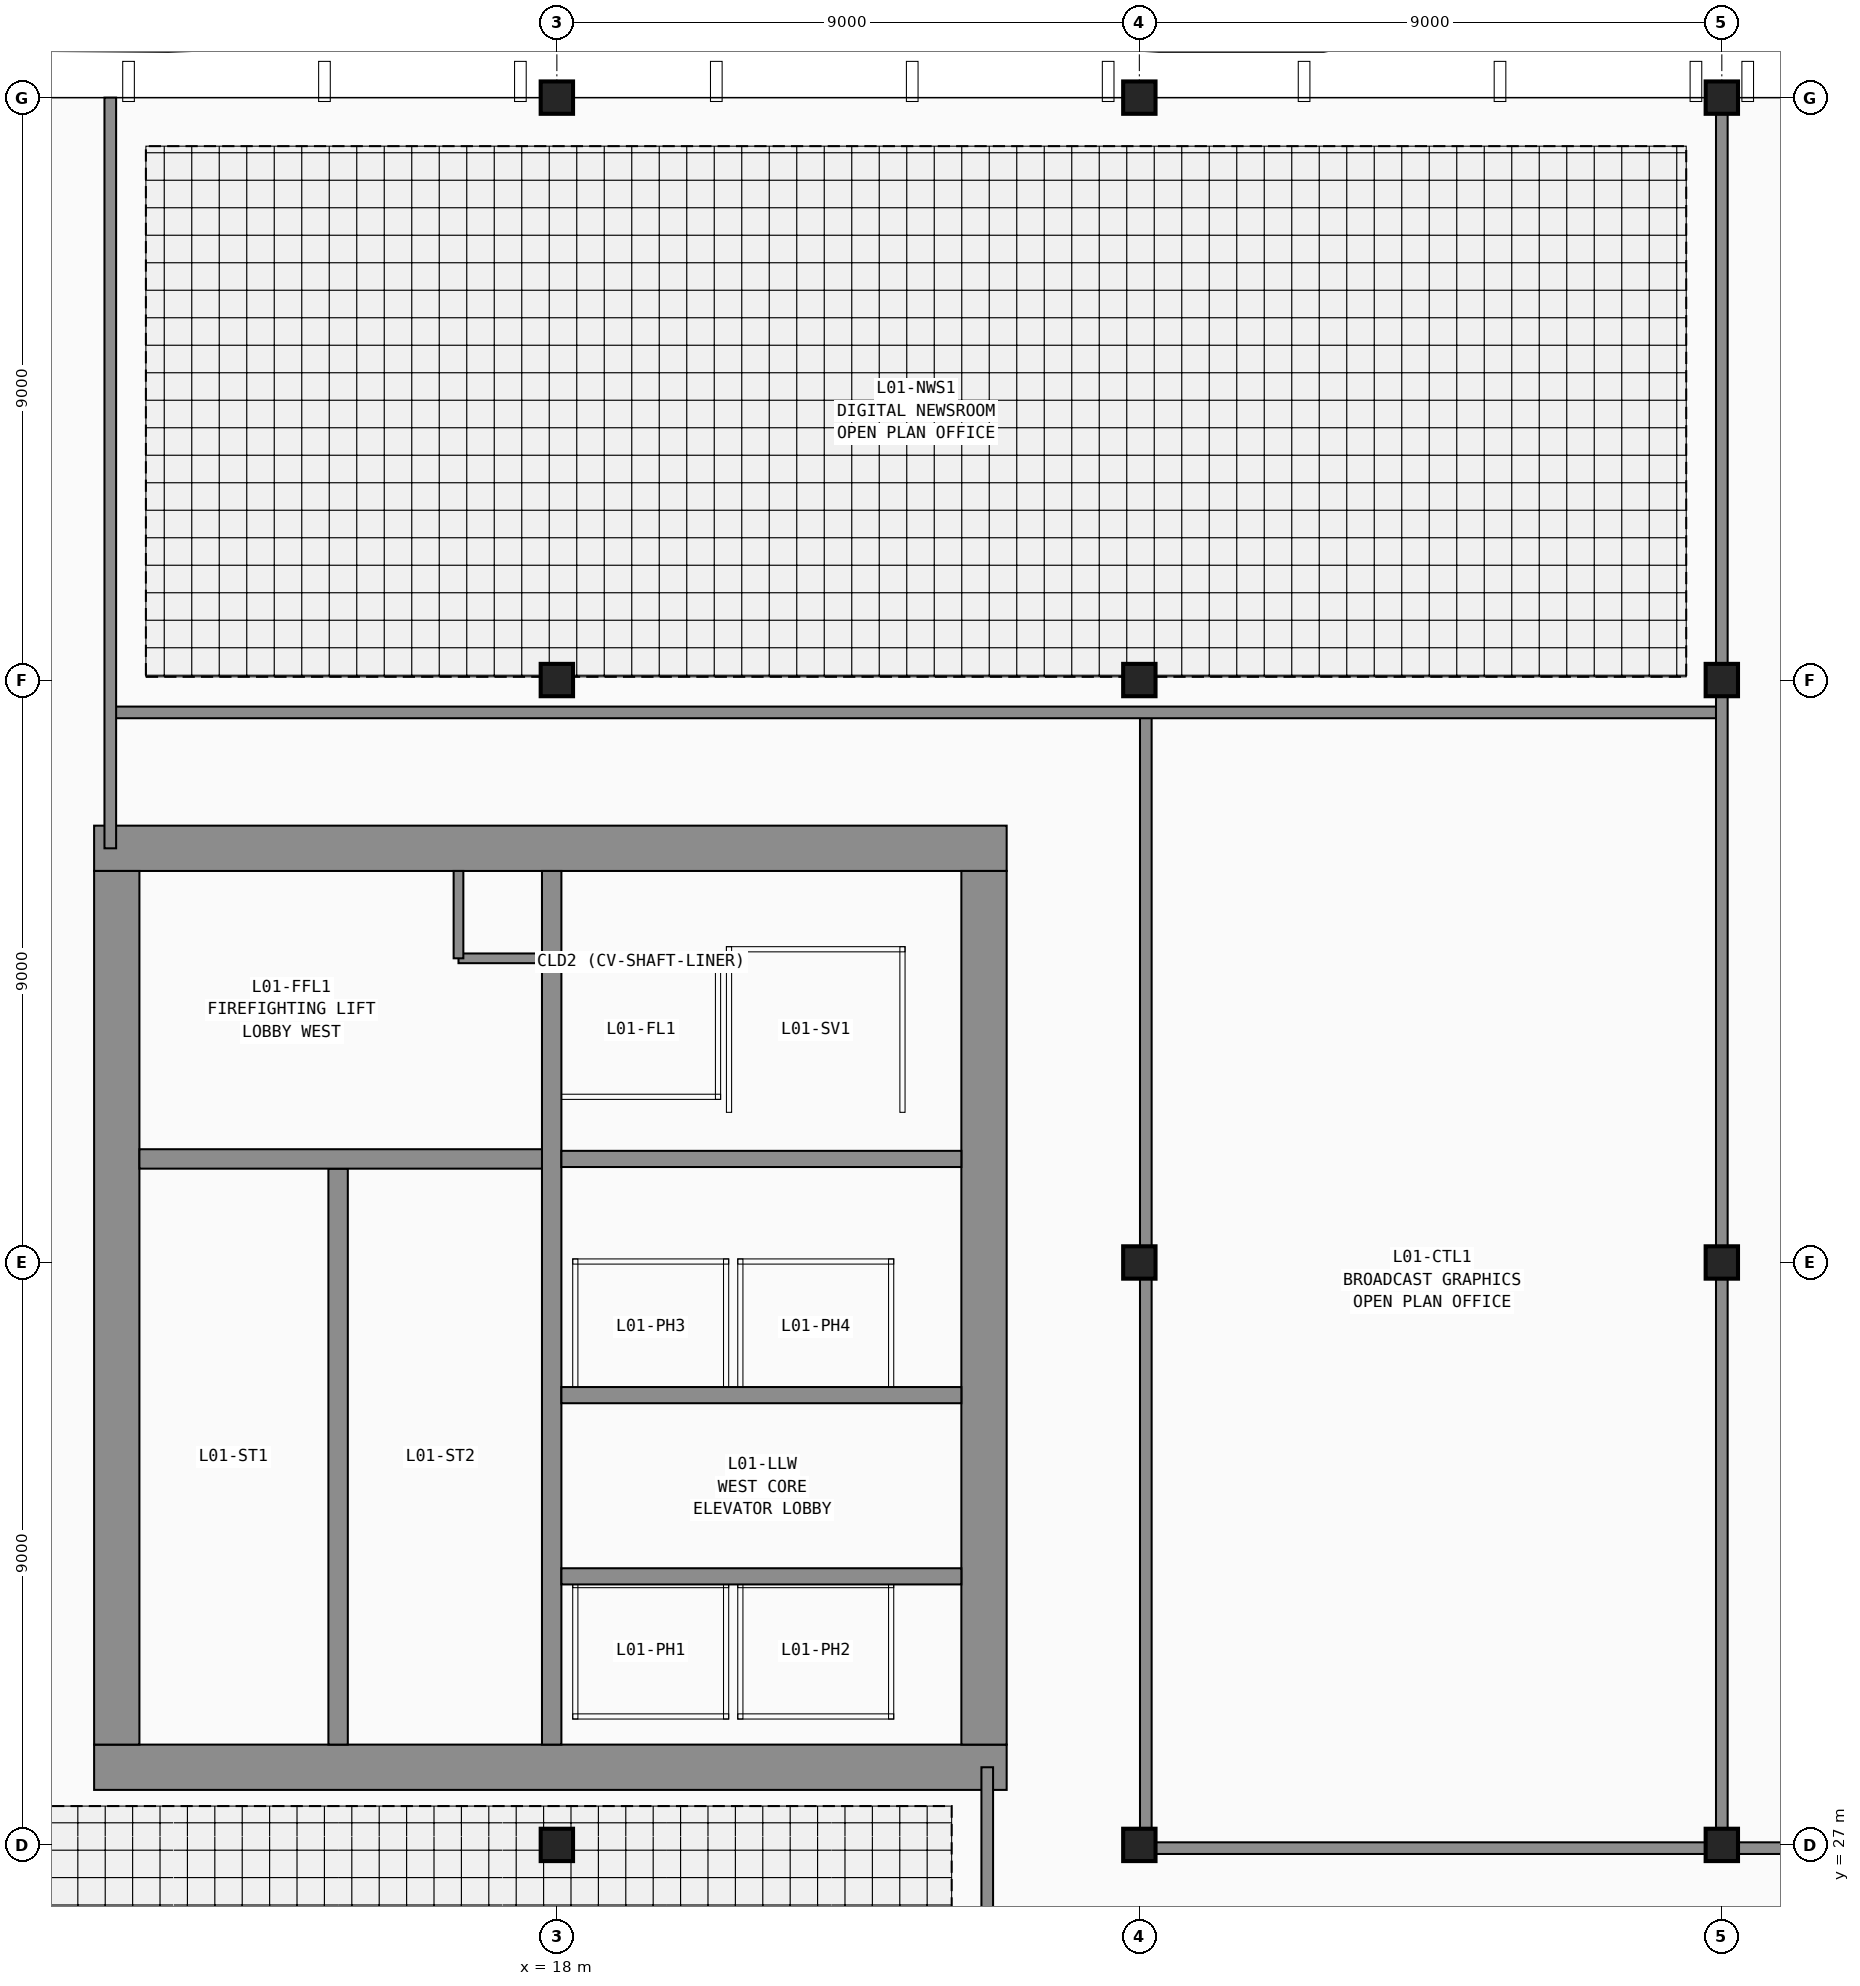
"""IFC4 building model, lengths in metres.
Left out: names, types, materials, properties, quantities, classifications, styles, units other than length and angle.
Written with IfcOpenShell. Run it as: python <this file> out.ifc"""

import sys

from ifc_helpers import new_model, si_unit, direction, frame, frame_2d, origin, origin_2d, place, context, subcontext, project, spatial, rectangle, i_section, extrude, element, fill, save


model = new_model("IFC4")
c1 = context("Model", 3, precision=1e-05, world=origin(), true_north=direction((0.0, 1.0)))
c2 = subcontext(c1, "Body", "Model", "MODEL_VIEW")
j1 = project(units=[si_unit("LENGTHUNIT", "METRE"), si_unit("PLANEANGLEUNIT", "RADIAN")], contexts=[c1])
p1 = place(None, origin())
s1 = spatial("IfcSite", under=j1, at=p1, CompositionType="ELEMENT")
p2 = place(p1, origin())
s2 = spatial("IfcBuilding", under=s1, at=p2, CompositionType="ELEMENT")
p3 = place(p2, frame((0.0, 0.0, 5.8)))
s3 = spatial("IfcBuildingStorey", under=s2, at=p3, CompositionType="ELEMENT", Elevation=5.8)
for number, where, z_axis, x_axis in (
    (1, (18.0, 27.0, 0.0), (0.0, 0.0, 1.0), (1.0, 0.0, 0.0)),
    (2, (18.0, 45.0, 0.0), (0.0, 0.0, 1.0), (1.0, 0.0, 0.0)),
    (3, (18.0, 54.0, 0.0), (0.0, 0.0, 1.0), (1.0, 0.0, 0.0)),
    (4, (27.0, 27.0, 0.0), (0.0, 0.0, 1.0), (1.0, 0.0, 0.0)),
    (5, (27.0, 36.0, 0.0), (0.0, 0.0, 1.0), (1.0, 0.0, 0.0)),
    (6, (27.0, 45.0, 0.0), (0.0, 0.0, 1.0), (1.0, 0.0, 0.0)),
    (7, (27.0, 54.0, 0.0), (0.0, 0.0, 1.0), (1.0, 0.0, 0.0)),
    (8, (36.0, 27.0, 0.0), (0.0, 0.0, 1.0), (1.0, 0.0, 0.0)),
    (9, (36.0, 36.0, 0.0), (0.0, 0.0, 1.0), (1.0, 0.0, 0.0)),
    (10, (36.0, 45.0, 0.0), (0.0, 0.0, 1.0), (1.0, 0.0, 0.0)),
    (11, (36.0, 54.0, 0.0), (0.0, 0.0, 1.0), (1.0, 0.0, 0.0)),
):
    element("IfcColumn", number, at=place(p3, frame(where, z_axis=z_axis, x_axis=x_axis)), inside=s3, PredefinedType="COLUMN", context=c2, shape_type="SweptSolid", body=[
        extrude(i_section(OverallWidth=0.442, OverallDepth=0.531, WebThickness=0.066, FlangeThickness=0.106, FilletRadius=0.015, at=origin_2d()), origin(), (0.0, 0.0, 1.0), 5.2),
    ])
p4 = place(p3, frame((10.85, 28.2, 0.0), z_axis=(0.0, 0.0, 1.0), x_axis=(1.0, 0.0, 0.0)))
e12 = element("IfcWall", 12, at=p4, inside=s3, PredefinedType="SHEAR", context=c2, shape_type="SweptSolid", body=[
    extrude(rectangle(XDim=14.1, YDim=0.7, at=frame_2d((7.05, 0.0))), origin(), (0.0, 0.0, 1.0), 4.88),
])
p5 = place(p3, frame((24.95, 42.4, 0.0), z_axis=(0.0, 0.0, 1.0), x_axis=(-1.0, 0.0, 0.0)))
e13 = element("IfcWall", 13, at=p5, inside=s3, PredefinedType="SHEAR", context=c2, shape_type="SweptSolid", body=[
    extrude(rectangle(XDim=14.1, YDim=0.7, at=frame_2d((7.05, 0.0))), origin(), (0.0, 0.0, 1.0), 4.88),
])
p6 = place(p5, frame((10.15, 0.0, 0.0)))
e14 = element("IfcOpeningElement", 14, at=p6, cuts=e13, PredefinedType="OPENING", context=c2, shape_type="SweptSolid", body=[
    extrude(rectangle(XDim=1.2, YDim=2.15, at=frame_2d((0.6, 1.075))), frame((0.0, 0.36, 0.0), z_axis=(0.0, -1.0, 0.0), x_axis=(1.0, 0.0, 0.0)), (0.0, 0.0, 1.0), 0.72),
])
p7 = place(p3, frame((11.2, 42.05, 0.0), z_axis=(0.0, 0.0, 1.0), x_axis=(0.0, -1.0, 0.0)))
e15 = element("IfcWall", 15, at=p7, inside=s3, PredefinedType="SHEAR", context=c2, shape_type="SweptSolid", body=[
    extrude(rectangle(XDim=13.5, YDim=0.7, at=frame_2d((6.75, 0.0))), origin(), (0.0, 0.0, 1.0), 4.88),
])
p8 = place(p3, frame((24.6, 28.55, 0.0), z_axis=(0.0, 0.0, 1.0), x_axis=(0.0, 1.0, 0.0)))
e16 = element("IfcWall", 16, at=p8, inside=s3, PredefinedType="SHEAR", context=c2, shape_type="SweptSolid", body=[
    extrude(rectangle(XDim=13.5, YDim=0.7, at=frame_2d((6.75, 0.0))), origin(), (0.0, 0.0, 1.0), 4.88),
])
p9 = place(p8, frame((3.25, 0.0, 0.0)))
e17 = element("IfcOpeningElement", 17, at=p9, cuts=e16, PredefinedType="OPENING", context=c2, shape_type="SweptSolid", body=[
    extrude(rectangle(XDim=1.5, YDim=2.2, at=frame_2d((0.75, 1.1))), frame((0.0, 0.36, 0.0), z_axis=(0.0, -1.0, 0.0), x_axis=(1.0, 0.0, 0.0)), (0.0, 0.0, 1.0), 0.72),
])
p10 = place(p8, frame((9.85, 0.0, 0.0)))
e18 = element("IfcOpeningElement", 18, at=p10, cuts=e16, PredefinedType="OPENING", context=c2, shape_type="SweptSolid", body=[
    extrude(rectangle(XDim=0.9, YDim=2.1, at=frame_2d((0.45, 1.05))), frame((0.0, 0.36, 0.0), z_axis=(0.0, -1.0, 0.0), x_axis=(1.0, 0.0, 0.0)), (0.0, 0.0, 1.0), 0.72),
])
p11 = place(p3, frame((14.62, 28.55, 0.0), z_axis=(0.0, 0.0, 1.0), x_axis=(0.0, 1.0, 0.0)))
e19 = element("IfcWall", 19, at=p11, inside=s3, PredefinedType="SHEAR", context=c2, shape_type="SweptSolid", body=[
    extrude(rectangle(XDim=8.9, YDim=0.3, at=frame_2d((4.45, 0.0))), origin(), (0.0, 0.0, 1.0), 4.88),
])
p12 = place(p3, frame((17.92, 42.05, 0.0), z_axis=(0.0, 0.0, 1.0), x_axis=(0.0, -1.0, 0.0)))
e20 = element("IfcWall", 20, at=p12, inside=s3, PredefinedType="SHEAR", context=c2, shape_type="SweptSolid", body=[
    extrude(rectangle(XDim=13.5, YDim=0.3, at=frame_2d((6.75, 0.0))), origin(), (0.0, 0.0, 1.0), 4.88),
])
p13 = place(p12, frame((1.875, 0.0, 0.0)))
e21 = element("IfcOpeningElement", 21, at=p13, cuts=e20, PredefinedType="OPENING", context=c2, shape_type="SweptSolid", body=[
    extrude(rectangle(XDim=1.15, YDim=2.15, at=frame_2d((0.575, 1.075))), frame((0.0, 0.16, 0.0), z_axis=(0.0, -1.0, 0.0), x_axis=(1.0, 0.0, 0.0)), (0.0, 0.0, 1.0), 0.32),
])
p14 = place(p3, frame((17.77, 37.6, 0.0), z_axis=(0.0, 0.0, 1.0), x_axis=(-1.0, 0.0, 0.0)))
e22 = element("IfcWall", 22, at=p14, inside=s3, PredefinedType="SHEAR", context=c2, shape_type="SweptSolid", body=[
    extrude(rectangle(XDim=6.22, YDim=0.3, at=frame_2d((3.11, 0.0))), origin(), (0.0, 0.0, 1.0), 4.88),
])
p15 = place(p14, frame((4.22, 0.0, 0.0)))
e23 = element("IfcOpeningElement", 23, at=p15, cuts=e22, PredefinedType="OPENING", context=c2, shape_type="SweptSolid", body=[
    extrude(rectangle(XDim=1.2, YDim=2.15, at=frame_2d((0.6, 1.075))), frame((0.0, 0.16, 0.0), z_axis=(0.0, -1.0, 0.0), x_axis=(1.0, 0.0, 0.0)), (0.0, 0.0, 1.0), 0.32),
])
p16 = place(p14, frame((1.12, 0.0, 0.0)))
e24 = element("IfcOpeningElement", 24, at=p16, cuts=e22, PredefinedType="OPENING", context=c2, shape_type="SweptSolid", body=[
    extrude(rectangle(XDim=1.2, YDim=2.15, at=frame_2d((0.6, 1.075))), frame((0.0, 0.16, 0.0), z_axis=(0.0, -1.0, 0.0), x_axis=(1.0, 0.0, 0.0)), (0.0, 0.0, 1.0), 0.32),
])
p17 = place(p3, frame((16.48, 40.7, 0.0), z_axis=(0.0, 0.0, 1.0), x_axis=(1.0, 0.0, 0.0)))
e25 = element("IfcWall", 25, at=p17, inside=s3, PredefinedType="PARTITIONING", context=c2, shape_type="SweptSolid", body=[
    extrude(rectangle(XDim=1.29, YDim=0.15, at=frame_2d((0.645, 0.0))), origin(), (0.0, 0.0, 1.0), 4.88),
])
p18 = place(p3, frame((16.48, 40.7, 0.0), z_axis=(0.0, 0.0, 1.0), x_axis=(0.0, 1.0, 0.0)))
e26 = element("IfcWall", 26, at=p18, inside=s3, PredefinedType="PARTITIONING", context=c2, shape_type="SweptSolid", body=[
    extrude(rectangle(XDim=1.35, YDim=0.15, at=frame_2d((0.675, 0.0))), origin(), (0.0, 0.0, 1.0), 4.88),
])
p19 = place(p3, frame((18.07, 37.6, 0.0), z_axis=(0.0, 0.0, 1.0), x_axis=(1.0, 0.0, 0.0)))
e27 = element("IfcWall", 27, at=p19, inside=s3, PredefinedType="PARTITIONING", context=c2, shape_type="SweptSolid", body=[
    extrude(rectangle(XDim=6.18, YDim=0.25, at=frame_2d((3.09, 0.0))), origin(), (0.0, 0.0, 1.0), 4.88),
])
p20 = place(p19, frame((3.03, 0.0, 0.0)))
e28 = element("IfcOpeningElement", 28, at=p20, cuts=e27, PredefinedType="OPENING", context=c2, shape_type="SweptSolid", body=[
    extrude(rectangle(XDim=1.8, YDim=2.3, at=frame_2d((0.9, 1.15))), frame((0.0, 0.135, 0.0), z_axis=(0.0, -1.0, 0.0), x_axis=(1.0, 0.0, 0.0)), (0.0, 0.0, 1.0), 0.27),
])
for number, where, z_axis, x_axis in (
    (29, (18.07, 31.15, 0.0), (0.0, 0.0, 1.0), (1.0, 0.0, 0.0)),
    (30, (24.25, 33.95, 0.0), (0.0, 0.0, 1.0), (-1.0, 0.0, 0.0)),
):
    element("IfcWall", number, at=place(p3, frame(where, z_axis=z_axis, x_axis=x_axis)), inside=s3, PredefinedType="PARTITIONING", context=c2, shape_type="SweptSolid", body=[
        extrude(rectangle(XDim=6.18, YDim=0.25, at=frame_2d((3.09, 0.0))), origin(), (0.0, 0.0, 1.0), 4.88),
    ])
p21 = place(p3, frame((24.65, 1.8, 0.0), z_axis=(0.0, 0.0, 1.0), x_axis=(0.0, 1.0, 0.0)))
e31 = element("IfcWall", 31, at=p21, inside=s3, PredefinedType="PARTITIONING", context=c2, shape_type="SweptSolid", body=[
    extrude(rectangle(XDim=26.4, YDim=0.18, at=frame_2d((13.2, 0.0))), origin(), (0.0, 0.0, 1.0), 3.912),
])
p22 = place(p21, frame((12.2, 0.0, 0.0)))
e32 = element("IfcOpeningElement", 32, at=p22, cuts=e31, PredefinedType="OPENING", context=c2, shape_type="SweptSolid", body=[
    extrude(rectangle(XDim=1.4, YDim=2.15, at=frame_2d((0.7, 1.075))), frame((0.0, 0.1, 0.0), z_axis=(0.0, -1.0, 0.0), x_axis=(1.0, 0.0, 0.0)), (0.0, 0.0, 1.0), 0.2),
])
p23 = place(p3, frame((27.1, 26.95, 0.0), z_axis=(0.0, 0.0, 1.0), x_axis=(1.0, 0.0, 0.0)))
e33 = element("IfcWall", 33, at=p23, inside=s3, PredefinedType="PARTITIONING", context=c2, shape_type="SweptSolid", body=[
    extrude(rectangle(XDim=35.9, YDim=0.18, at=frame_2d((17.95, 0.0))), origin(), (0.0, 0.0, 1.0), 3.933),
])
p24 = place(p3, frame((27.1, 26.95, 0.0), z_axis=(0.0, 0.0, 1.0), x_axis=(0.0, 1.0, 0.0)))
e34 = element("IfcWall", 34, at=p24, inside=s3, PredefinedType="PARTITIONING", context=c2, shape_type="SweptSolid", body=[
    extrude(rectangle(XDim=17.55, YDim=0.18, at=frame_2d((8.775, 0.0))), origin(), (0.0, 0.0, 1.0), 3.933),
])
p25 = place(p24, frame((4.5, 0.0, 0.0)))
e35 = element("IfcOpeningElement", 35, at=p25, cuts=e34, PredefinedType="OPENING", context=c2, shape_type="SweptSolid", body=[
    extrude(rectangle(XDim=1.0, YDim=2.1, at=frame_2d((0.5, 1.05))), frame((0.0, 0.1, 0.0), z_axis=(0.0, -1.0, 0.0), x_axis=(1.0, 0.0, 0.0)), (0.0, 0.0, 1.0), 0.2),
])
p26 = place(p3, frame((11.1, 44.5, 0.0), z_axis=(0.0, 0.0, 1.0), x_axis=(1.0, 0.0, 0.0)))
e36 = element("IfcWall", 36, at=p26, inside=s3, PredefinedType="PARTITIONING", context=c2, shape_type="SweptSolid", body=[
    extrude(rectangle(XDim=24.9, YDim=0.18, at=frame_2d((12.45, 0.0))), origin(), (0.0, 0.0, 1.0), 4.005),
])
p27 = place(p26, frame((4.5, 0.0, 0.0)))
e37 = element("IfcOpeningElement", 37, at=p27, cuts=e36, PredefinedType="OPENING", context=c2, shape_type="SweptSolid", body=[
    extrude(rectangle(XDim=1.05, YDim=2.15, at=frame_2d((0.525, 1.075))), frame((0.0, 0.1, 0.0), z_axis=(0.0, -1.0, 0.0), x_axis=(1.0, 0.0, 0.0)), (0.0, 0.0, 1.0), 0.2),
])
p28 = place(p3, frame((36.0, 26.95, 0.0), z_axis=(0.0, 0.0, 1.0), x_axis=(0.0, 1.0, 0.0)))
e38 = element("IfcWall", 38, at=p28, inside=s3, PredefinedType="PARTITIONING", context=c2, shape_type="SweptSolid", body=[
    extrude(rectangle(XDim=27.05, YDim=0.18, at=frame_2d((13.525, 0.0))), origin(), (0.0, 0.0, 1.0), 3.933),
])
p29 = place(p28, frame((4.5, 0.0, 0.0)))
e39 = element("IfcOpeningElement", 39, at=p29, cuts=e38, PredefinedType="OPENING", context=c2, shape_type="SweptSolid", body=[
    extrude(rectangle(XDim=1.2, YDim=2.15, at=frame_2d((0.6, 1.075))), frame((0.0, 0.1, 0.0), z_axis=(0.0, -1.0, 0.0), x_axis=(1.0, 0.0, 0.0)), (0.0, 0.0, 1.0), 0.2),
])
p30 = place(p3, frame((11.1, 42.4, 0.0), z_axis=(0.0, 0.0, 1.0), x_axis=(0.0, 1.0, 0.0)))
e40 = element("IfcWall", 40, at=p30, inside=s3, PredefinedType="PARTITIONING", context=c2, shape_type="SweptSolid", body=[
    extrude(rectangle(XDim=11.6, YDim=0.18, at=frame_2d((5.8, 0.0))), origin(), (0.0, 0.0, 1.0), 3.933),
])
p31 = place(p30, frame((4.5, 0.0, 0.0)))
e41 = element("IfcOpeningElement", 41, at=p31, cuts=e40, PredefinedType="OPENING", context=c2, shape_type="SweptSolid", body=[
    extrude(rectangle(XDim=0.95, YDim=2.1, at=frame_2d((0.475, 1.05))), frame((0.0, 0.1, 0.0), z_axis=(0.0, -1.0, 0.0), x_axis=(1.0, 0.0, 0.0)), (0.0, 0.0, 1.0), 0.2),
])
p32 = place(p3, frame((0.0, 0.0, -0.32)))
p33 = place(p32, frame((10.2, 48.0, 0.0)))
p34 = place(p33, frame((0.0, 0.0, 0.27)))
e42 = element("IfcDoor", 42, at=p34, inside=s3, OperationType="SINGLE_SWING_LEFT", PredefinedType="TRAPDOOR", context=c2, shape_type="SweptSolid", body=[
    extrude(rectangle(XDim=1.0, YDim=1.2, at=origin_2d()), origin(), (0.0, 0.0, 1.0), 0.05),
])
p35 = place(p15, origin())
e43 = element("IfcDoor", 43, at=p35, inside=s3, OperationType="SINGLE_SWING_LEFT", PredefinedType="DOOR", context=c2, shape_type="SweptSolid", body=[
    extrude(rectangle(XDim=1.2, YDim=2.15, at=frame_2d((0.6, 1.075))), frame((0.0, 0.025, 0.0), z_axis=(0.0, -1.0, 0.0), x_axis=(1.0, 0.0, 0.0)), (0.0, 0.0, 1.0), 0.05),
])
fill(e23, e43)
p36 = place(p16, origin())
e44 = element("IfcDoor", 44, at=p36, inside=s3, OperationType="SINGLE_SWING_RIGHT", PredefinedType="DOOR", context=c2, shape_type="SweptSolid", body=[
    extrude(rectangle(XDim=1.2, YDim=2.15, at=frame_2d((0.6, 1.075))), frame((0.0, 0.025, 0.0), z_axis=(0.0, -1.0, 0.0), x_axis=(1.0, 0.0, 0.0)), (0.0, 0.0, 1.0), 0.05),
])
fill(e24, e44)
p37 = place(p9, origin())
e45 = element("IfcDoor", 45, at=p37, inside=s3, OperationType="DOUBLE_DOOR_SINGLE_SWING", PredefinedType="DOOR", context=c2, shape_type="SweptSolid", body=[
    extrude(rectangle(XDim=1.5, YDim=2.2, at=frame_2d((0.75, 1.1))), frame((0.0, 0.025, 0.0), z_axis=(0.0, -1.0, 0.0), x_axis=(1.0, 0.0, 0.0)), (0.0, 0.0, 1.0), 0.05),
])
fill(e17, e45)
p38 = place(p6, origin())
e46 = element("IfcDoor", 46, at=p38, inside=s3, OperationType="SINGLE_SWING_LEFT", PredefinedType="DOOR", context=c2, shape_type="SweptSolid", body=[
    extrude(rectangle(XDim=1.2, YDim=2.15, at=frame_2d((0.6, 1.075))), frame((0.0, 0.025, 0.0), z_axis=(0.0, -1.0, 0.0), x_axis=(1.0, 0.0, 0.0)), (0.0, 0.0, 1.0), 0.05),
])
fill(e14, e46)
p39 = place(p10, origin())
e47 = element("IfcDoor", 47, at=p39, inside=s3, OperationType="SINGLE_SWING_LEFT", PredefinedType="DOOR", context=c2, shape_type="SweptSolid", body=[
    extrude(rectangle(XDim=0.9, YDim=2.1, at=frame_2d((0.45, 1.05))), frame((0.0, 0.025, 0.0), z_axis=(0.0, -1.0, 0.0), x_axis=(1.0, 0.0, 0.0)), (0.0, 0.0, 1.0), 0.05),
])
fill(e18, e47)
p40 = place(p13, origin())
e48 = element("IfcDoor", 48, at=p40, inside=s3, OperationType="DOUBLE_DOOR_SLIDING", PredefinedType="DOOR", context=c2, shape_type="SweptSolid", body=[
    extrude(rectangle(XDim=1.15, YDim=2.15, at=frame_2d((0.575, 1.075))), frame((0.0, 0.025, 0.0), z_axis=(0.0, -1.0, 0.0), x_axis=(1.0, 0.0, 0.0)), (0.0, 0.0, 1.0), 0.05),
])
fill(e21, e48)
p41 = place(p20, origin())
e49 = element("IfcDoor", 49, at=p41, inside=s3, OperationType="DOUBLE_DOOR_SLIDING", PredefinedType="DOOR", context=c2, shape_type="SweptSolid", body=[
    extrude(rectangle(XDim=1.8, YDim=2.3, at=frame_2d((0.9, 1.15))), frame((0.0, 0.025, 0.0), z_axis=(0.0, -1.0, 0.0), x_axis=(1.0, 0.0, 0.0)), (0.0, 0.0, 1.0), 0.05),
])
fill(e28, e49)
p42 = place(p25, origin())
e50 = element("IfcDoor", 50, at=p42, inside=s3, OperationType="SINGLE_SWING_RIGHT", PredefinedType="DOOR", context=c2, shape_type="SweptSolid", body=[
    extrude(rectangle(XDim=1.0, YDim=2.1, at=frame_2d((0.5, 1.05))), frame((0.0, 0.025, 0.0), z_axis=(0.0, -1.0, 0.0), x_axis=(1.0, 0.0, 0.0)), (0.0, 0.0, 1.0), 0.05),
])
fill(e35, e50)
p43 = place(p27, origin())
e51 = element("IfcDoor", 51, at=p43, inside=s3, OperationType="SINGLE_SWING_LEFT", PredefinedType="DOOR", context=c2, shape_type="SweptSolid", body=[
    extrude(rectangle(XDim=1.05, YDim=2.15, at=frame_2d((0.525, 1.075))), frame((0.0, 0.025, 0.0), z_axis=(0.0, -1.0, 0.0), x_axis=(1.0, 0.0, 0.0)), (0.0, 0.0, 1.0), 0.05),
])
fill(e37, e51)
p44 = place(p29, origin())
e52 = element("IfcDoor", 52, at=p44, inside=s3, OperationType="SINGLE_SWING_RIGHT", PredefinedType="DOOR", context=c2, shape_type="SweptSolid", body=[
    extrude(rectangle(XDim=1.2, YDim=2.15, at=frame_2d((0.6, 1.075))), frame((0.0, 0.025, 0.0), z_axis=(0.0, -1.0, 0.0), x_axis=(1.0, 0.0, 0.0)), (0.0, 0.0, 1.0), 0.05),
])
fill(e39, e52)
p45 = place(p31, origin())
e53 = element("IfcDoor", 53, at=p45, inside=s3, OperationType="SINGLE_SWING_RIGHT", PredefinedType="DOOR", context=c2, shape_type="SweptSolid", body=[
    extrude(rectangle(XDim=0.95, YDim=2.1, at=frame_2d((0.475, 1.05))), frame((0.0, 0.025, 0.0), z_axis=(0.0, -1.0, 0.0), x_axis=(1.0, 0.0, 0.0)), (0.0, 0.0, 1.0), 0.05),
])
fill(e41, e53)
save(model, sys.argv[1])
